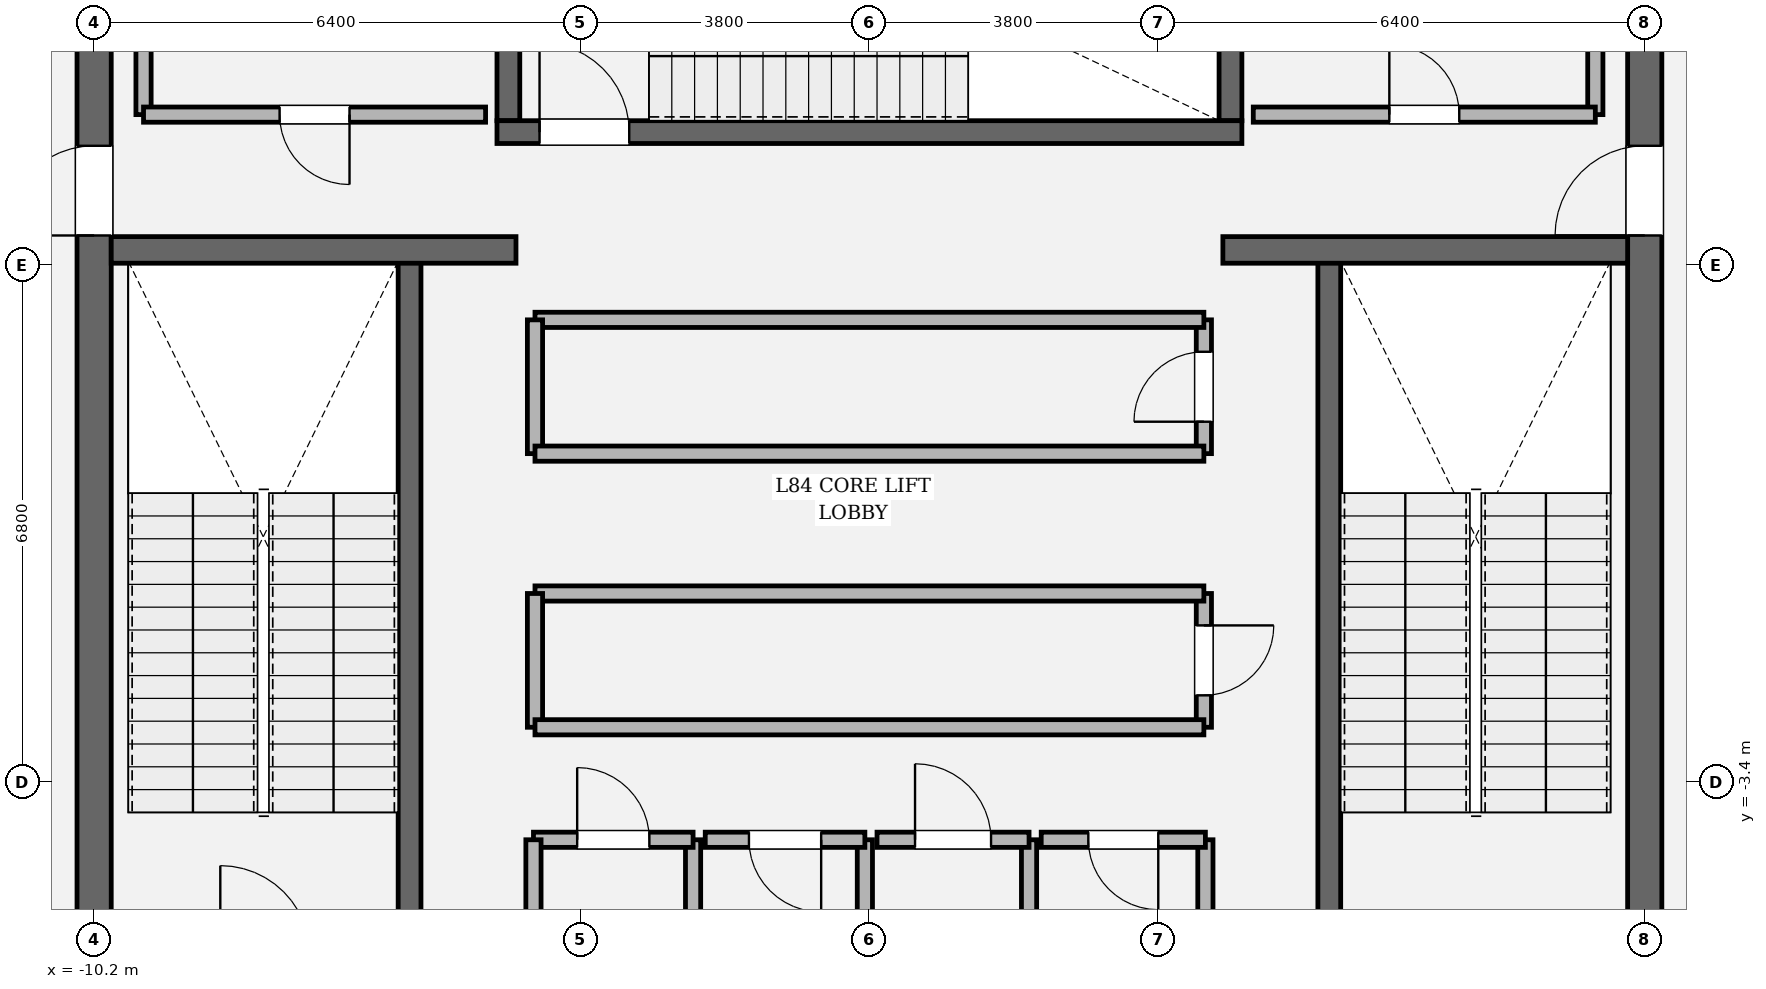
"""IFC4 building model, lengths in metres.
Left out: names, types, materials, properties, quantities, classifications, styles, units other than length and angle.
Written with IfcOpenShell. Run it as: python <this file> out.ifc"""

import sys

from ifc_helpers import new_model, si_unit, direction, frame, frame_2d, origin, place, context, subcontext, project, spatial, rectangle, extrude, element, fill, save


model = new_model("IFC4")
c1 = context("Model", 3, precision=1e-05, world=origin(), true_north=direction((0.0, 1.0)))
c2 = subcontext(c1, "Body", "Model", "MODEL_VIEW")
j1 = project(units=[si_unit("LENGTHUNIT", "METRE"), si_unit("PLANEANGLEUNIT", "RADIAN")], contexts=[c1])
p1 = place(None, origin())
s1 = spatial("IfcSite", under=j1, at=p1, CompositionType="ELEMENT")
p2 = place(p1, origin())
s2 = spatial("IfcBuilding", under=s1, at=p2, CompositionType="ELEMENT")
p3 = place(p2, frame((0.0, 0.0, 357.3)))
s3 = spatial("IfcBuildingStorey", under=s2, at=p3, CompositionType="ELEMENT", Elevation=357.3)
p4 = place(p3, frame((-10.2, -8.975, 0.0), z_axis=(0.0, 0.0, 1.0), x_axis=(0.0, 1.0, 0.0)))
e1 = element("IfcWall", 1, at=p4, inside=s3, PredefinedType="SHEAR", context=c2, shape_type="SweptSolid", body=[
    extrude(rectangle(XDim=17.95, YDim=0.45, at=frame_2d((8.975, 0.0))), origin(), (0.0, 0.0, 1.0), 4.5),
])
p5 = place(p4, frame((12.765, 0.0, 0.0)))
e2 = element("IfcOpeningElement", 2, at=p5, cuts=e1, PredefinedType="OPENING", context=c2, shape_type="SweptSolid", body=[
    extrude(rectangle(XDim=1.18, YDim=2.2, at=frame_2d((0.59, 1.1))), frame((0.0, 0.235, 0.0), z_axis=(0.0, -1.0, 0.0), x_axis=(1.0, 0.0, 0.0)), (0.0, 0.0, 1.0), 0.47),
])
p6 = place(p3, frame((10.2, 8.975, 0.0), z_axis=(0.0, 0.0, 1.0), x_axis=(0.0, -1.0, 0.0)))
e3 = element("IfcWall", 3, at=p6, inside=s3, PredefinedType="SHEAR", context=c2, shape_type="SweptSolid", body=[
    extrude(rectangle(XDim=17.95, YDim=0.45, at=frame_2d((8.975, 0.0))), origin(), (0.0, 0.0, 1.0), 4.5),
])
p7 = place(p6, frame((4.005, 0.0, 0.0)))
e4 = element("IfcOpeningElement", 4, at=p7, cuts=e3, PredefinedType="OPENING", context=c2, shape_type="SweptSolid", body=[
    extrude(rectangle(XDim=1.18, YDim=2.2, at=frame_2d((0.59, 1.1))), frame((0.0, 0.235, 0.0), z_axis=(0.0, -1.0, 0.0), x_axis=(1.0, 0.0, 0.0)), (0.0, 0.0, 1.0), 0.47),
])
for number, where, z_axis, x_axis in (
    (5, (-6.05, -5.5, 0.0), (0.0, 0.0, 1.0), (0.0, 1.0, 0.0)),
    (6, (6.05, 3.45, 0.0), (0.0, 0.0, 1.0), (0.0, -1.0, 0.0)),
):
    element("IfcWall", number, at=place(p3, frame(where, z_axis=z_axis, x_axis=x_axis)), inside=s3, PredefinedType="SOLIDWALL", context=c2, shape_type="SweptSolid", body=[
        extrude(rectangle(XDim=8.95, YDim=0.3, at=frame_2d((4.475, 0.0))), origin(), (0.0, 0.0, 1.0), 4.5),
    ])
for number, where, z_axis, x_axis in (
    (7, (-4.75, 5.3, 0.0), (0.0, 0.0, 1.0), (0.0, 1.0, 0.0)),
    (8, (4.75, 8.975, 0.0), (0.0, 0.0, 1.0), (0.0, -1.0, 0.0)),
):
    element("IfcWall", number, at=place(p3, frame(where, z_axis=z_axis, x_axis=x_axis)), inside=s3, PredefinedType="SOLIDWALL", context=c2, shape_type="SweptSolid", body=[
        extrude(rectangle(XDim=3.675, YDim=0.3, at=frame_2d((1.837, 0.0))), origin(), (0.0, 0.0, 1.0), 4.5),
    ])
p8 = place(p3, frame((-4.9, 5.15, 0.0), z_axis=(0.0, 0.0, 1.0), x_axis=(1.0, 0.0, 0.0)))
e9 = element("IfcWall", 9, at=p8, inside=s3, PredefinedType="SOLIDWALL", context=c2, shape_type="SweptSolid", body=[
    extrude(rectangle(XDim=9.8, YDim=0.3, at=frame_2d((4.9, 0.0))), origin(), (0.0, 0.0, 1.0), 4.5),
])
p9 = place(p8, frame((0.56, 0.0, 0.0)))
e10 = element("IfcOpeningElement", 10, at=p9, cuts=e9, PredefinedType="OPENING", context=c2, shape_type="SweptSolid", body=[
    extrude(rectangle(XDim=1.18, YDim=2.2, at=frame_2d((0.59, 1.1))), frame((0.0, 0.16, 0.0), z_axis=(0.0, -1.0, 0.0), x_axis=(1.0, 0.0, 0.0)), (0.0, 0.0, 1.0), 0.32),
])
for number, where, z_axis, x_axis in (
    (11, (-9.975, 3.6, 0.0), (0.0, 0.0, 1.0), (1.0, 0.0, 0.0)),
    (12, (4.65, 3.6, 0.0), (0.0, 0.0, 1.0), (1.0, 0.0, 0.0)),
):
    element("IfcWall", number, at=place(p3, frame(where, z_axis=z_axis, x_axis=x_axis)), inside=s3, PredefinedType="SOLIDWALL", context=c2, shape_type="SweptSolid", body=[
        extrude(rectangle(XDim=5.325, YDim=0.35, at=frame_2d((2.663, 0.0))), origin(), (0.0, 0.0, 1.0), 4.5),
    ])
p10 = place(p3, frame((-2.32, -5.9, 0.0), z_axis=(0.0, 0.0, 1.0), x_axis=(0.0, 1.0, 0.0)))
e13 = element("IfcWall", 13, at=p10, inside=s3, PredefinedType="SOLIDWALL", context=c2, shape_type="SweptSolid", body=[
    extrude(rectangle(XDim=1.74, YDim=0.2, at=frame_2d((0.87, 0.0))), origin(), (0.0, 0.0, 1.0), 4.22),
])
p11 = place(p3, frame((-2.32, -4.16, 0.0), z_axis=(0.0, 0.0, 1.0), x_axis=(-1.0, 0.0, 0.0)))
e14 = element("IfcWall", 14, at=p11, inside=s3, PredefinedType="SOLIDWALL", context=c2, shape_type="SweptSolid", body=[
    extrude(rectangle(XDim=2.1, YDim=0.2, at=frame_2d((1.05, 0.0))), origin(), (0.0, 0.0, 1.0), 4.22),
])
p12 = place(p11, frame((0.575, 0.0, 0.0)))
e15 = element("IfcOpeningElement", 15, at=p12, cuts=e14, PredefinedType="OPENING", context=c2, shape_type="SweptSolid", body=[
    extrude(rectangle(XDim=0.95, YDim=2.15, at=frame_2d((0.475, 1.075))), frame((0.0, 0.11, 0.0), z_axis=(0.0, -1.0, 0.0), x_axis=(1.0, 0.0, 0.0)), (0.0, 0.0, 1.0), 0.22),
])
for number, where, z_axis, x_axis in (
    (16, (-4.42, -4.16, 0.0), (0.0, 0.0, 1.0), (0.0, -1.0, 0.0)),
    (17, (-0.06, -5.9, 0.0), (0.0, 0.0, 1.0), (0.0, 1.0, 0.0)),
):
    element("IfcWall", number, at=place(p3, frame(where, z_axis=z_axis, x_axis=x_axis)), inside=s3, PredefinedType="SOLIDWALL", context=c2, shape_type="SweptSolid", body=[
        extrude(rectangle(XDim=1.74, YDim=0.2, at=frame_2d((0.87, 0.0))), origin(), (0.0, 0.0, 1.0), 4.22),
    ])
p13 = place(p3, frame((-0.06, -4.16, 0.0), z_axis=(0.0, 0.0, 1.0), x_axis=(-1.0, 0.0, 0.0)))
e18 = element("IfcWall", 18, at=p13, inside=s3, PredefinedType="SOLIDWALL", context=c2, shape_type="SweptSolid", body=[
    extrude(rectangle(XDim=2.1, YDim=0.2, at=frame_2d((1.05, 0.0))), origin(), (0.0, 0.0, 1.0), 4.22),
])
p14 = place(p13, frame((0.575, 0.0, 0.0)))
e19 = element("IfcOpeningElement", 19, at=p14, cuts=e18, PredefinedType="OPENING", context=c2, shape_type="SweptSolid", body=[
    extrude(rectangle(XDim=0.95, YDim=2.15, at=frame_2d((0.475, 1.075))), frame((0.0, 0.11, 0.0), z_axis=(0.0, -1.0, 0.0), x_axis=(1.0, 0.0, 0.0)), (0.0, 0.0, 1.0), 0.22),
])
p15 = place(p3, frame((2.1, -5.9, 0.0), z_axis=(0.0, 0.0, 1.0), x_axis=(0.0, 1.0, 0.0)))
e20 = element("IfcWall", 20, at=p15, inside=s3, PredefinedType="SOLIDWALL", context=c2, shape_type="SweptSolid", body=[
    extrude(rectangle(XDim=1.74, YDim=0.2, at=frame_2d((0.87, 0.0))), origin(), (0.0, 0.0, 1.0), 4.22),
])
p16 = place(p3, frame((2.1, -4.16, 0.0), z_axis=(0.0, 0.0, 1.0), x_axis=(-1.0, 0.0, 0.0)))
e21 = element("IfcWall", 21, at=p16, inside=s3, PredefinedType="SOLIDWALL", context=c2, shape_type="SweptSolid", body=[
    extrude(rectangle(XDim=2.0, YDim=0.2, at=frame_2d((1.0, 0.0))), origin(), (0.0, 0.0, 1.0), 4.22),
])
p17 = place(p16, frame((0.5, 0.0, 0.0)))
e22 = element("IfcOpeningElement", 22, at=p17, cuts=e21, PredefinedType="OPENING", context=c2, shape_type="SweptSolid", body=[
    extrude(rectangle(XDim=1.0, YDim=2.15, at=frame_2d((0.5, 1.075))), frame((0.0, 0.11, 0.0), z_axis=(0.0, -1.0, 0.0), x_axis=(1.0, 0.0, 0.0)), (0.0, 0.0, 1.0), 0.22),
])
p18 = place(p3, frame((4.42, -5.9, 0.0), z_axis=(0.0, 0.0, 1.0), x_axis=(0.0, 1.0, 0.0)))
e23 = element("IfcWall", 23, at=p18, inside=s3, PredefinedType="SOLIDWALL", context=c2, shape_type="SweptSolid", body=[
    extrude(rectangle(XDim=1.74, YDim=0.2, at=frame_2d((0.87, 0.0))), origin(), (0.0, 0.0, 1.0), 4.22),
])
p19 = place(p3, frame((4.42, -4.16, 0.0), z_axis=(0.0, 0.0, 1.0), x_axis=(-1.0, 0.0, 0.0)))
e24 = element("IfcWall", 24, at=p19, inside=s3, PredefinedType="SOLIDWALL", context=c2, shape_type="SweptSolid", body=[
    extrude(rectangle(XDim=2.16, YDim=0.2, at=frame_2d((1.08, 0.0))), origin(), (0.0, 0.0, 1.0), 4.22),
])
p20 = place(p19, frame((0.62, 0.0, 0.0)))
e25 = element("IfcOpeningElement", 25, at=p20, cuts=e24, PredefinedType="OPENING", context=c2, shape_type="SweptSolid", body=[
    extrude(rectangle(XDim=0.92, YDim=2.1, at=frame_2d((0.46, 1.05))), frame((0.0, 0.11, 0.0), z_axis=(0.0, -1.0, 0.0), x_axis=(1.0, 0.0, 0.0)), (0.0, 0.0, 1.0), 0.22),
])
p21 = place(p3, frame((4.4, -2.68, 0.0), z_axis=(0.0, 0.0, 1.0), x_axis=(0.0, 1.0, 0.0)))
e26 = element("IfcWall", 26, at=p21, inside=s3, PredefinedType="SOLIDWALL", context=c2, shape_type="SweptSolid", body=[
    extrude(rectangle(XDim=1.76, YDim=0.2, at=frame_2d((0.88, 0.0))), origin(), (0.0, 0.0, 1.0), 4.22),
])
p22 = place(p21, frame((0.42, 0.0, 0.0)))
e27 = element("IfcOpeningElement", 27, at=p22, cuts=e26, PredefinedType="OPENING", context=c2, shape_type="SweptSolid", body=[
    extrude(rectangle(XDim=0.92, YDim=2.1, at=frame_2d((0.46, 1.05))), frame((0.0, 0.11, 0.0), z_axis=(0.0, -1.0, 0.0), x_axis=(1.0, 0.0, 0.0)), (0.0, 0.0, 1.0), 0.22),
])
p23 = place(p3, frame((4.4, -0.92, 0.0), z_axis=(0.0, 0.0, 1.0), x_axis=(-1.0, 0.0, 0.0)))
e28 = element("IfcWall", 28, at=p23, inside=s3, PredefinedType="SOLIDWALL", context=c2, shape_type="SweptSolid", body=[
    extrude(rectangle(XDim=8.8, YDim=0.2, at=frame_2d((4.4, 0.0))), origin(), (0.0, 0.0, 1.0), 4.22),
])
p24 = place(p3, frame((-4.4, -0.92, 0.0), z_axis=(0.0, 0.0, 1.0), x_axis=(0.0, -1.0, 0.0)))
e29 = element("IfcWall", 29, at=p24, inside=s3, PredefinedType="SOLIDWALL", context=c2, shape_type="SweptSolid", body=[
    extrude(rectangle(XDim=1.76, YDim=0.2, at=frame_2d((0.88, 0.0))), origin(), (0.0, 0.0, 1.0), 4.22),
])
p25 = place(p3, frame((-4.4, -2.68, 0.0), z_axis=(0.0, 0.0, 1.0), x_axis=(1.0, 0.0, 0.0)))
e30 = element("IfcWall", 30, at=p25, inside=s3, PredefinedType="SOLIDWALL", context=c2, shape_type="SweptSolid", body=[
    extrude(rectangle(XDim=8.8, YDim=0.2, at=frame_2d((4.4, 0.0))), origin(), (0.0, 0.0, 1.0), 4.22),
])
p26 = place(p3, frame((4.4, 0.92, 0.0), z_axis=(0.0, 0.0, 1.0), x_axis=(0.0, 1.0, 0.0)))
e31 = element("IfcWall", 31, at=p26, inside=s3, PredefinedType="SOLIDWALL", context=c2, shape_type="SweptSolid", body=[
    extrude(rectangle(XDim=1.76, YDim=0.2, at=frame_2d((0.88, 0.0))), origin(), (0.0, 0.0, 1.0), 4.22),
])
p27 = place(p26, frame((0.42, 0.0, 0.0)))
e32 = element("IfcOpeningElement", 32, at=p27, cuts=e31, PredefinedType="OPENING", context=c2, shape_type="SweptSolid", body=[
    extrude(rectangle(XDim=0.92, YDim=2.1, at=frame_2d((0.46, 1.05))), frame((0.0, 0.11, 0.0), z_axis=(0.0, -1.0, 0.0), x_axis=(1.0, 0.0, 0.0)), (0.0, 0.0, 1.0), 0.22),
])
p28 = place(p3, frame((4.4, 2.68, 0.0), z_axis=(0.0, 0.0, 1.0), x_axis=(-1.0, 0.0, 0.0)))
e33 = element("IfcWall", 33, at=p28, inside=s3, PredefinedType="SOLIDWALL", context=c2, shape_type="SweptSolid", body=[
    extrude(rectangle(XDim=8.8, YDim=0.2, at=frame_2d((4.4, 0.0))), origin(), (0.0, 0.0, 1.0), 4.22),
])
p29 = place(p3, frame((-4.4, 2.68, 0.0), z_axis=(0.0, 0.0, 1.0), x_axis=(0.0, -1.0, 0.0)))
e34 = element("IfcWall", 34, at=p29, inside=s3, PredefinedType="SOLIDWALL", context=c2, shape_type="SweptSolid", body=[
    extrude(rectangle(XDim=1.76, YDim=0.2, at=frame_2d((0.88, 0.0))), origin(), (0.0, 0.0, 1.0), 4.22),
])
p30 = place(p3, frame((-4.4, 0.92, 0.0), z_axis=(0.0, 0.0, 1.0), x_axis=(1.0, 0.0, 0.0)))
e35 = element("IfcWall", 35, at=p30, inside=s3, PredefinedType="SOLIDWALL", context=c2, shape_type="SweptSolid", body=[
    extrude(rectangle(XDim=8.8, YDim=0.2, at=frame_2d((4.4, 0.0))), origin(), (0.0, 0.0, 1.0), 4.22),
])
p31 = place(p3, frame((-9.55, 8.65, 0.0), z_axis=(0.0, 0.0, 1.0), x_axis=(0.0, -1.0, 0.0)))
e36 = element("IfcWall", 36, at=p31, inside=s3, PredefinedType="SOLIDWALL", context=c2, shape_type="SweptSolid", body=[
    extrude(rectangle(XDim=3.27, YDim=0.2, at=frame_2d((1.635, 0.0))), origin(), (0.0, 0.0, 1.0), 4.22),
])
p32 = place(p3, frame((-9.55, 5.38, 0.0), z_axis=(0.0, 0.0, 1.0), x_axis=(1.0, 0.0, 0.0)))
e37 = element("IfcWall", 37, at=p32, inside=s3, PredefinedType="SOLIDWALL", context=c2, shape_type="SweptSolid", body=[
    extrude(rectangle(XDim=4.5, YDim=0.2, at=frame_2d((2.25, 0.0))), origin(), (0.0, 0.0, 1.0), 4.22),
])
p33 = place(p32, frame((1.79, 0.0, 0.0)))
e38 = element("IfcOpeningElement", 38, at=p33, cuts=e37, PredefinedType="OPENING", context=c2, shape_type="SweptSolid", body=[
    extrude(rectangle(XDim=0.92, YDim=2.1, at=frame_2d((0.46, 1.05))), frame((0.0, 0.11, 0.0), z_axis=(0.0, -1.0, 0.0), x_axis=(1.0, 0.0, 0.0)), (0.0, 0.0, 1.0), 0.22),
])
p34 = place(p3, frame((9.55, 5.38, 0.0), z_axis=(0.0, 0.0, 1.0), x_axis=(0.0, 1.0, 0.0)))
e39 = element("IfcWall", 39, at=p34, inside=s3, PredefinedType="SOLIDWALL", context=c2, shape_type="SweptSolid", body=[
    extrude(rectangle(XDim=3.27, YDim=0.2, at=frame_2d((1.635, 0.0))), origin(), (0.0, 0.0, 1.0), 4.22),
])
p35 = place(p3, frame((5.05, 5.38, 0.0), z_axis=(0.0, 0.0, 1.0), x_axis=(1.0, 0.0, 0.0)))
e40 = element("IfcWall", 40, at=p35, inside=s3, PredefinedType="SOLIDWALL", context=c2, shape_type="SweptSolid", body=[
    extrude(rectangle(XDim=4.5, YDim=0.2, at=frame_2d((2.25, 0.0))), origin(), (0.0, 0.0, 1.0), 4.22),
])
p36 = place(p35, frame((1.79, 0.0, 0.0)))
e41 = element("IfcOpeningElement", 41, at=p36, cuts=e40, PredefinedType="OPENING", context=c2, shape_type="SweptSolid", body=[
    extrude(rectangle(XDim=0.92, YDim=2.1, at=frame_2d((0.46, 1.05))), frame((0.0, 0.11, 0.0), z_axis=(0.0, -1.0, 0.0), x_axis=(1.0, 0.0, 0.0)), (0.0, 0.0, 1.0), 0.22),
])
p37 = place(p9, origin())
e42 = element("IfcDoor", 42, at=p37, inside=s3, OperationType="SINGLE_SWING_LEFT", PredefinedType="DOOR", context=c2, shape_type="SweptSolid", body=[
    extrude(rectangle(XDim=1.18, YDim=2.2, at=frame_2d((0.59, 1.1))), frame((0.0, 0.025, 0.0), z_axis=(0.0, -1.0, 0.0), x_axis=(1.0, 0.0, 0.0)), (0.0, 0.0, 1.0), 0.05),
])
fill(e10, e42)
p38 = place(p5, origin())
e43 = element("IfcDoor", 43, at=p38, inside=s3, OperationType="SINGLE_SWING_LEFT", PredefinedType="DOOR", context=c2, shape_type="SweptSolid", body=[
    extrude(rectangle(XDim=1.18, YDim=2.2, at=frame_2d((0.59, 1.1))), frame((0.0, 0.025, 0.0), z_axis=(0.0, -1.0, 0.0), x_axis=(1.0, 0.0, 0.0)), (0.0, 0.0, 1.0), 0.05),
])
fill(e2, e43)
p39 = place(p7, origin())
e44 = element("IfcDoor", 44, at=p39, inside=s3, OperationType="SINGLE_SWING_RIGHT", PredefinedType="DOOR", context=c2, shape_type="SweptSolid", body=[
    extrude(rectangle(XDim=1.18, YDim=2.2, at=frame_2d((0.59, 1.1))), frame((0.0, 0.025, 0.0), z_axis=(0.0, -1.0, 0.0), x_axis=(1.0, 0.0, 0.0)), (0.0, 0.0, 1.0), 0.05),
])
fill(e4, e44)
p40 = place(p12, origin())
e45 = element("IfcDoor", 45, at=p40, inside=s3, OperationType="SINGLE_SWING_RIGHT", PredefinedType="DOOR", context=c2, shape_type="SweptSolid", body=[
    extrude(rectangle(XDim=0.95, YDim=2.15, at=frame_2d((0.475, 1.075))), frame((0.0, 0.025, 0.0), z_axis=(0.0, -1.0, 0.0), x_axis=(1.0, 0.0, 0.0)), (0.0, 0.0, 1.0), 0.05),
])
fill(e15, e45)
p41 = place(p14, origin())
e46 = element("IfcDoor", 46, at=p41, inside=s3, OperationType="SINGLE_SWING_LEFT", PredefinedType="DOOR", context=c2, shape_type="SweptSolid", body=[
    extrude(rectangle(XDim=0.95, YDim=2.15, at=frame_2d((0.475, 1.075))), frame((0.0, 0.025, 0.0), z_axis=(0.0, -1.0, 0.0), x_axis=(1.0, 0.0, 0.0)), (0.0, 0.0, 1.0), 0.05),
])
fill(e19, e46)
p42 = place(p17, origin())
e47 = element("IfcDoor", 47, at=p42, inside=s3, OperationType="SINGLE_SWING_RIGHT", PredefinedType="DOOR", context=c2, shape_type="SweptSolid", body=[
    extrude(rectangle(XDim=1.0, YDim=2.15, at=frame_2d((0.5, 1.075))), frame((0.0, 0.025, 0.0), z_axis=(0.0, -1.0, 0.0), x_axis=(1.0, 0.0, 0.0)), (0.0, 0.0, 1.0), 0.05),
])
fill(e22, e47)
p43 = place(p20, origin())
e48 = element("IfcDoor", 48, at=p43, inside=s3, OperationType="SINGLE_SWING_LEFT", PredefinedType="DOOR", context=c2, shape_type="SweptSolid", body=[
    extrude(rectangle(XDim=0.92, YDim=2.1, at=frame_2d((0.46, 1.05))), frame((0.0, 0.025, 0.0), z_axis=(0.0, -1.0, 0.0), x_axis=(1.0, 0.0, 0.0)), (0.0, 0.0, 1.0), 0.05),
])
fill(e25, e48)
p44 = place(p22, origin())
e49 = element("IfcDoor", 49, at=p44, inside=s3, OperationType="SINGLE_SWING_RIGHT", PredefinedType="DOOR", context=c2, shape_type="SweptSolid", body=[
    extrude(rectangle(XDim=0.92, YDim=2.1, at=frame_2d((0.46, 1.05))), frame((0.0, 0.025, 0.0), z_axis=(0.0, -1.0, 0.0), x_axis=(1.0, 0.0, 0.0)), (0.0, 0.0, 1.0), 0.05),
])
fill(e27, e49)
p45 = place(p27, origin())
e50 = element("IfcDoor", 50, at=p45, inside=s3, OperationType="SINGLE_SWING_LEFT", PredefinedType="DOOR", context=c2, shape_type="SweptSolid", body=[
    extrude(rectangle(XDim=0.92, YDim=2.1, at=frame_2d((0.46, 1.05))), frame((0.0, 0.025, 0.0), z_axis=(0.0, -1.0, 0.0), x_axis=(1.0, 0.0, 0.0)), (0.0, 0.0, 1.0), 0.05),
])
fill(e32, e50)
p46 = place(p33, origin())
e51 = element("IfcDoor", 51, at=p46, inside=s3, OperationType="SINGLE_SWING_RIGHT", PredefinedType="DOOR", context=c2, shape_type="SweptSolid", body=[
    extrude(rectangle(XDim=0.92, YDim=2.1, at=frame_2d((0.46, 1.05))), frame((0.0, 0.025, 0.0), z_axis=(0.0, -1.0, 0.0), x_axis=(1.0, 0.0, 0.0)), (0.0, 0.0, 1.0), 0.05),
])
fill(e38, e51)
p47 = place(p36, origin())
e52 = element("IfcDoor", 52, at=p47, inside=s3, OperationType="SINGLE_SWING_LEFT", PredefinedType="DOOR", context=c2, shape_type="SweptSolid", body=[
    extrude(rectangle(XDim=0.92, YDim=2.1, at=frame_2d((0.46, 1.05))), frame((0.0, 0.025, 0.0), z_axis=(0.0, -1.0, 0.0), x_axis=(1.0, 0.0, 0.0)), (0.0, 0.0, 1.0), 0.05),
])
fill(e41, e52)
save(model, sys.argv[1])
